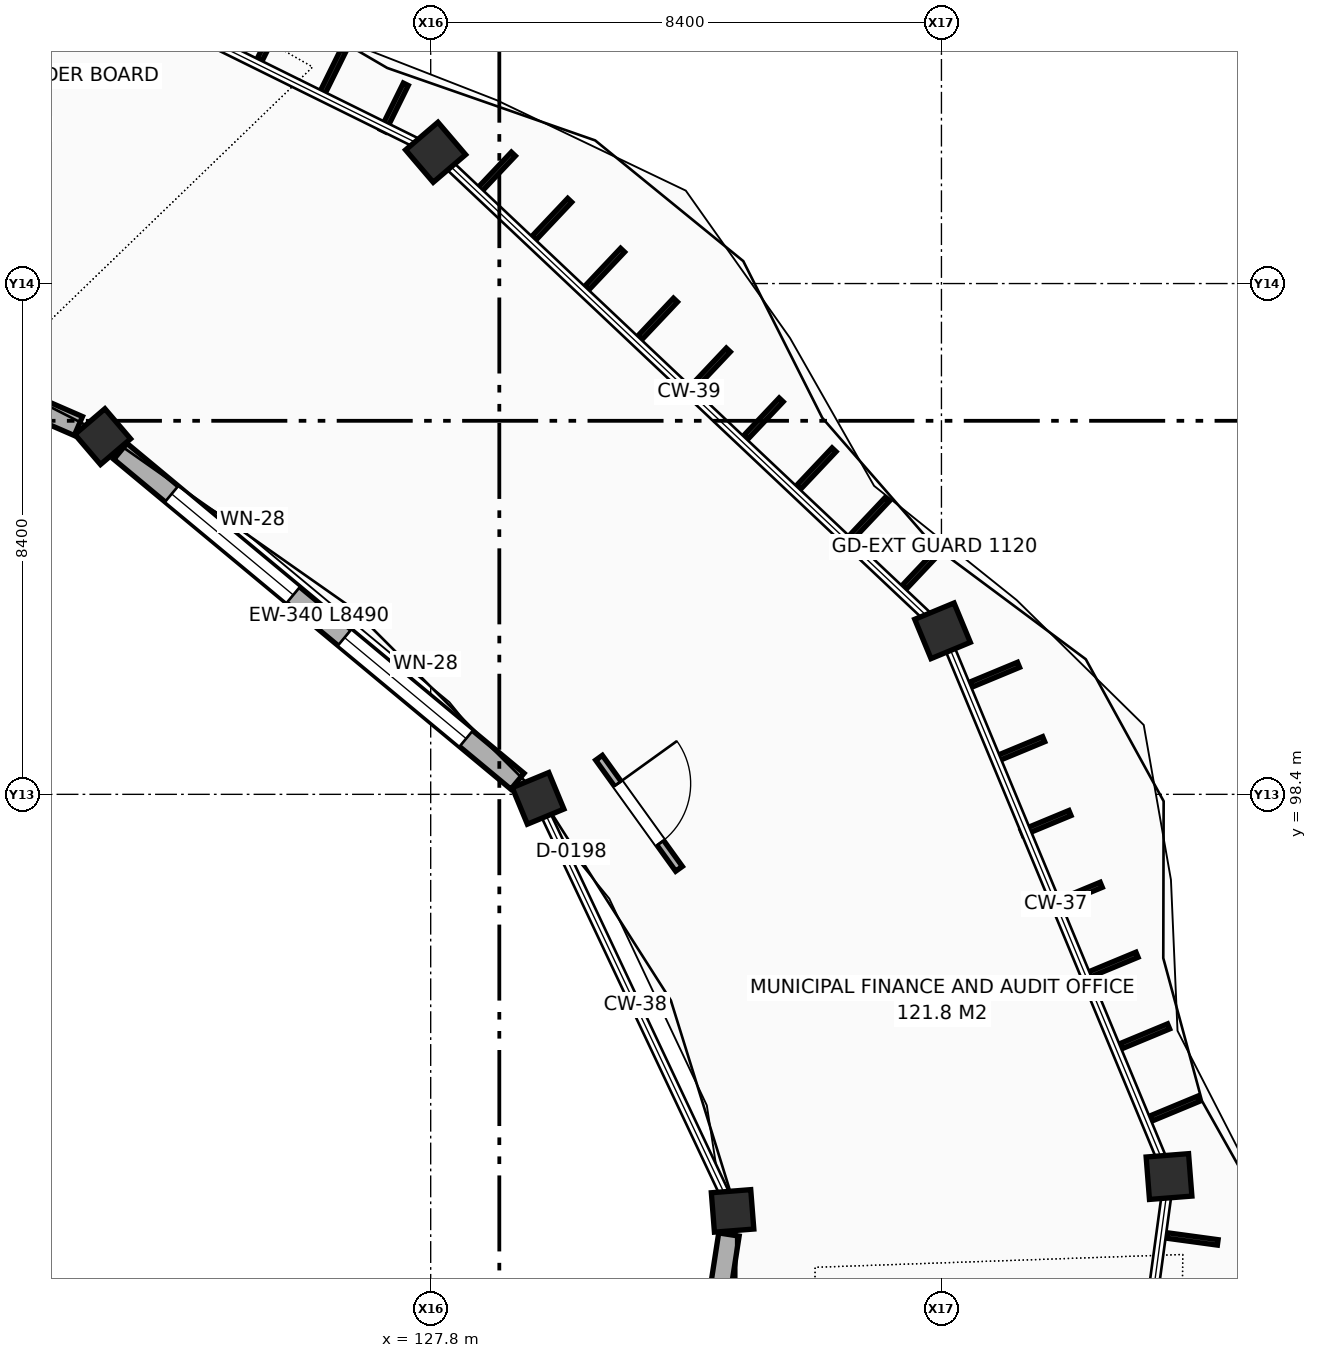
"""IFC4 building model, lengths in metres.
Left out: names, types, materials, properties, quantities, classifications, styles, units other than length and angle.
Written with IfcOpenShell. Run it as: python <this file> out.ifc"""

import sys

from ifc_helpers import new_model, si_unit, direction, frame, frame_2d, origin, origin_2d, place, context, subcontext, project, spatial, rectangle, extrude, element, fill, save


model = new_model("IFC4")
c1 = context("Model", 3, precision=1e-05, world=origin(), true_north=direction((0.0, 1.0)))
c2 = subcontext(c1, "Body", "Model", "MODEL_VIEW")
j1 = project(units=[si_unit("LENGTHUNIT", "METRE"), si_unit("PLANEANGLEUNIT", "RADIAN")], contexts=[c1])
p1 = place(None, origin())
s1 = spatial("IfcSite", under=j1, at=p1, CompositionType="ELEMENT")
p2 = place(p1, origin())
s2 = spatial("IfcBuilding", under=s1, at=p2, CompositionType="ELEMENT")
p3 = place(p2, frame((0.0, 0.0, 9.6)))
s3 = spatial("IfcBuildingStorey", under=s2, at=p3, CompositionType="ELEMENT", Elevation=9.6)
p4 = place(p3, frame((139.943, 92.115, 0.0), z_axis=(0.0, 0.0, 1.0), x_axis=(0.996917333733, 0.078459095728, 0.0)))
e1 = element("IfcColumn", 1, at=p4, inside=s3, PredefinedType="COLUMN", context=c2, shape_type="SweptSolid", body=[
    extrude(rectangle(XDim=0.7, YDim=0.7, at=origin_2d()), origin(), (0.0, 0.0, 1.0), 4.2),
])
p5 = place(p3, frame((132.765, 91.55, 0.0), z_axis=(0.0, 0.0, 1.0), x_axis=(0.996917333733, 0.078459095728, 0.0)))
e2 = element("IfcColumn", 2, at=p5, inside=s3, PredefinedType="COLUMN", context=c2, shape_type="SweptSolid", body=[
    extrude(rectangle(XDim=0.65, YDim=0.65, at=origin_2d()), origin(), (0.0, 0.0, 1.0), 4.2),
])
p6 = place(p3, frame((136.218, 101.089, 0.0), z_axis=(0.0, 0.0, 1.0), x_axis=(0.923879532511, 0.382683432365, 0.0)))
e3 = element("IfcColumn", 3, at=p6, inside=s3, PredefinedType="COLUMN", context=c2, shape_type="SweptSolid", body=[
    extrude(rectangle(XDim=0.7, YDim=0.7, at=origin_2d()), origin(), (0.0, 0.0, 1.0), 4.2),
])
p7 = place(p3, frame((129.566, 98.334, 0.0), z_axis=(0.0, 0.0, 1.0), x_axis=(0.923879532511, 0.382683432365, 0.0)))
e4 = element("IfcColumn", 4, at=p7, inside=s3, PredefinedType="COLUMN", context=c2, shape_type="SweptSolid", body=[
    extrude(rectangle(XDim=0.65, YDim=0.65, at=origin_2d()), origin(), (0.0, 0.0, 1.0), 4.2),
])
p8 = place(p3, frame((127.881, 108.959, 0.0), z_axis=(0.0, 0.0, 1.0), x_axis=(0.7604059656, 0.64944804833, 0.0)))
e5 = element("IfcColumn", 5, at=p8, inside=s3, PredefinedType="COLUMN", context=c2, shape_type="SweptSolid", body=[
    extrude(rectangle(XDim=0.7, YDim=0.7, at=origin_2d()), origin(), (0.0, 0.0, 1.0), 4.2),
])
p9 = place(p3, frame((122.406, 104.283, 0.0), z_axis=(0.0, 0.0, 1.0), x_axis=(0.7604059656, 0.64944804833, 0.0)))
e6 = element("IfcColumn", 6, at=p9, inside=s3, PredefinedType="COLUMN", context=c2, shape_type="SweptSolid", body=[
    extrude(rectangle(XDim=0.65, YDim=0.65, at=origin_2d()), origin(), (0.0, 0.0, 1.0), 4.2),
])
p10 = place(p3, frame((129.227, 98.615, 0.0), z_axis=(0.0, 0.0, 1.0), x_axis=(-0.769151449901, 0.639066543574, 0.0)))
e7 = element("IfcWall", 7, at=p10, inside=s3, PredefinedType="SOLIDWALL", context=c2, shape_type="SweptSolid", body=[
    extrude(rectangle(XDim=8.49, YDim=0.34, at=frame_2d((4.245, 0.0))), origin(), (0.0, 0.0, 1.0), 3.387),
])
p11 = place(p10, frame((1.097, 0.0, 0.9)))
e8 = element("IfcOpeningElement", 8, at=p11, cuts=e7, PredefinedType="OPENING", context=c2, shape_type="SweptSolid", body=[
    extrude(rectangle(XDim=2.6, YDim=1.6, at=frame_2d((1.3, 0.8))), frame((0.0, 0.18, 0.0), z_axis=(0.0, -1.0, 0.0), x_axis=(1.0, 0.0, 0.0)), (0.0, 0.0, 1.0), 0.36),
])
p12 = place(p10, frame((4.794, 0.0, 0.9)))
e9 = element("IfcOpeningElement", 9, at=p12, cuts=e7, PredefinedType="OPENING", context=c2, shape_type="SweptSolid", body=[
    extrude(rectangle(XDim=2.6, YDim=1.6, at=frame_2d((1.3, 0.8))), frame((0.0, 0.18, 0.0), z_axis=(0.0, -1.0, 0.0), x_axis=(1.0, 0.0, 0.0)), (0.0, 0.0, 1.0), 0.36),
])
p13 = place(p3, frame((122.005, 104.457, 0.0), z_axis=(0.0, 0.0, 1.0), x_axis=(-0.917047260006, 0.398778538685, 0.0)))
e10 = element("IfcWall", 10, at=p13, inside=s3, PredefinedType="SOLIDWALL", context=c2, shape_type="SweptSolid", body=[
    extrude(rectangle(XDim=10.557, YDim=0.34, at=frame_2d((5.279, 0.0))), origin(), (0.0, 0.0, 1.0), 3.387),
])
p14 = place(p13, frame((2.719, 0.0, 0.9)))
e11 = element("IfcOpeningElement", 11, at=p14, cuts=e10, PredefinedType="OPENING", context=c2, shape_type="SweptSolid", body=[
    extrude(rectangle(XDim=1.2, YDim=2.1, at=frame_2d((0.6, 1.05))), frame((0.0, 0.18, 0.0), z_axis=(0.0, -1.0, 0.0), x_axis=(1.0, 0.0, 0.0)), (0.0, 0.0, 1.0), 0.36),
])
p15 = place(p13, frame((6.638, 0.0, 0.9)))
e12 = element("IfcOpeningElement", 12, at=p15, cuts=e10, PredefinedType="OPENING", context=c2, shape_type="SweptSolid", body=[
    extrude(rectangle(XDim=1.2, YDim=2.1, at=frame_2d((0.6, 1.05))), frame((0.0, 0.18, 0.0), z_axis=(0.0, -1.0, 0.0), x_axis=(1.0, 0.0, 0.0)), (0.0, 0.0, 1.0), 0.36),
])
p16 = place(p3, frame((131.744, 84.943, 0.0), z_axis=(0.0, 0.0, 1.0), x_axis=(0.15279186299, 0.988258390607, 0.0)))
e13 = element("IfcWall", 13, at=p16, inside=s3, PredefinedType="SOLIDWALL", context=c2, shape_type="SweptSolid", body=[
    extrude(rectangle(XDim=6.292, YDim=0.34, at=frame_2d((3.146, 0.0))), origin(), (0.0, 0.0, 1.0), 3.387),
])
p17 = place(p16, frame((1.298, 0.0, 0.9)))
e14 = element("IfcOpeningElement", 14, at=p17, cuts=e13, PredefinedType="OPENING", context=c2, shape_type="SweptSolid", body=[
    extrude(rectangle(XDim=1.2, YDim=2.1, at=frame_2d((0.6, 1.05))), frame((0.0, 0.18, 0.0), z_axis=(0.0, -1.0, 0.0), x_axis=(1.0, 0.0, 0.0)), (0.0, 0.0, 1.0), 0.36),
])
p18 = place(p16, frame((3.795, 0.0, 0.9)))
e15 = element("IfcOpeningElement", 15, at=p18, cuts=e13, PredefinedType="OPENING", context=c2, shape_type="SweptSolid", body=[
    extrude(rectangle(XDim=1.2, YDim=2.1, at=frame_2d((0.6, 1.05))), frame((0.0, 0.18, 0.0), z_axis=(0.0, -1.0, 0.0), x_axis=(1.0, 0.0, 0.0)), (0.0, 0.0, 1.0), 0.36),
])
p19 = place(p3, frame((130.569, 99.002, 0.0), z_axis=(0.0, 0.0, 1.0), x_axis=(0.584301868487, -0.811536398742, 0.0)))
e16 = element("IfcWall", 16, at=p19, inside=s3, PredefinedType="PARTITIONING", context=c2, shape_type="SweptSolid", body=[
    extrude(rectangle(XDim=2.251, YDim=0.135, at=frame_2d((1.125, 0.0))), origin(), (0.0, 0.0, 1.0), 3.86),
])
p20 = place(p19, frame((0.525, 0.0, 0.0)))
e17 = element("IfcOpeningElement", 17, at=p20, cuts=e16, PredefinedType="OPENING", context=c2, shape_type="SweptSolid", body=[
    extrude(rectangle(XDim=1.2, YDim=2.2, at=frame_2d((0.6, 1.1))), frame((0.0, 0.077, 0.0), z_axis=(0.0, -1.0, 0.0), x_axis=(1.0, 0.0, 0.0)), (0.0, 0.0, 1.0), 0.155),
])
p21 = place(p11, origin())
e18 = element("IfcWindow", 18, at=p21, inside=s3, PartitioningType="SINGLE_PANEL", PredefinedType="WINDOW", context=c2, shape_type="SweptSolid", body=[
    extrude(rectangle(XDim=2.6, YDim=1.6, at=frame_2d((1.3, 0.8))), frame((0.0, 0.03, 0.0), z_axis=(0.0, -1.0, 0.0), x_axis=(1.0, 0.0, 0.0)), (0.0, 0.0, 1.0), 0.06),
])
fill(e8, e18)
p22 = place(p12, origin())
e19 = element("IfcWindow", 19, at=p22, inside=s3, PartitioningType="SINGLE_PANEL", PredefinedType="WINDOW", context=c2, shape_type="SweptSolid", body=[
    extrude(rectangle(XDim=2.6, YDim=1.6, at=frame_2d((1.3, 0.8))), frame((0.0, 0.03, 0.0), z_axis=(0.0, -1.0, 0.0), x_axis=(1.0, 0.0, 0.0)), (0.0, 0.0, 1.0), 0.06),
])
fill(e9, e19)
p23 = place(p20, origin())
e20 = element("IfcDoor", 20, at=p23, inside=s3, OperationType="SINGLE_SWING_LEFT", PredefinedType="DOOR", context=c2, shape_type="SweptSolid", body=[
    extrude(rectangle(XDim=1.2, YDim=2.2, at=frame_2d((0.6, 1.1))), frame((0.0, 0.025, 0.0), z_axis=(0.0, -1.0, 0.0), x_axis=(1.0, 0.0, 0.0)), (0.0, 0.0, 1.0), 0.05),
])
fill(e17, e20)
save(model, sys.argv[1])
